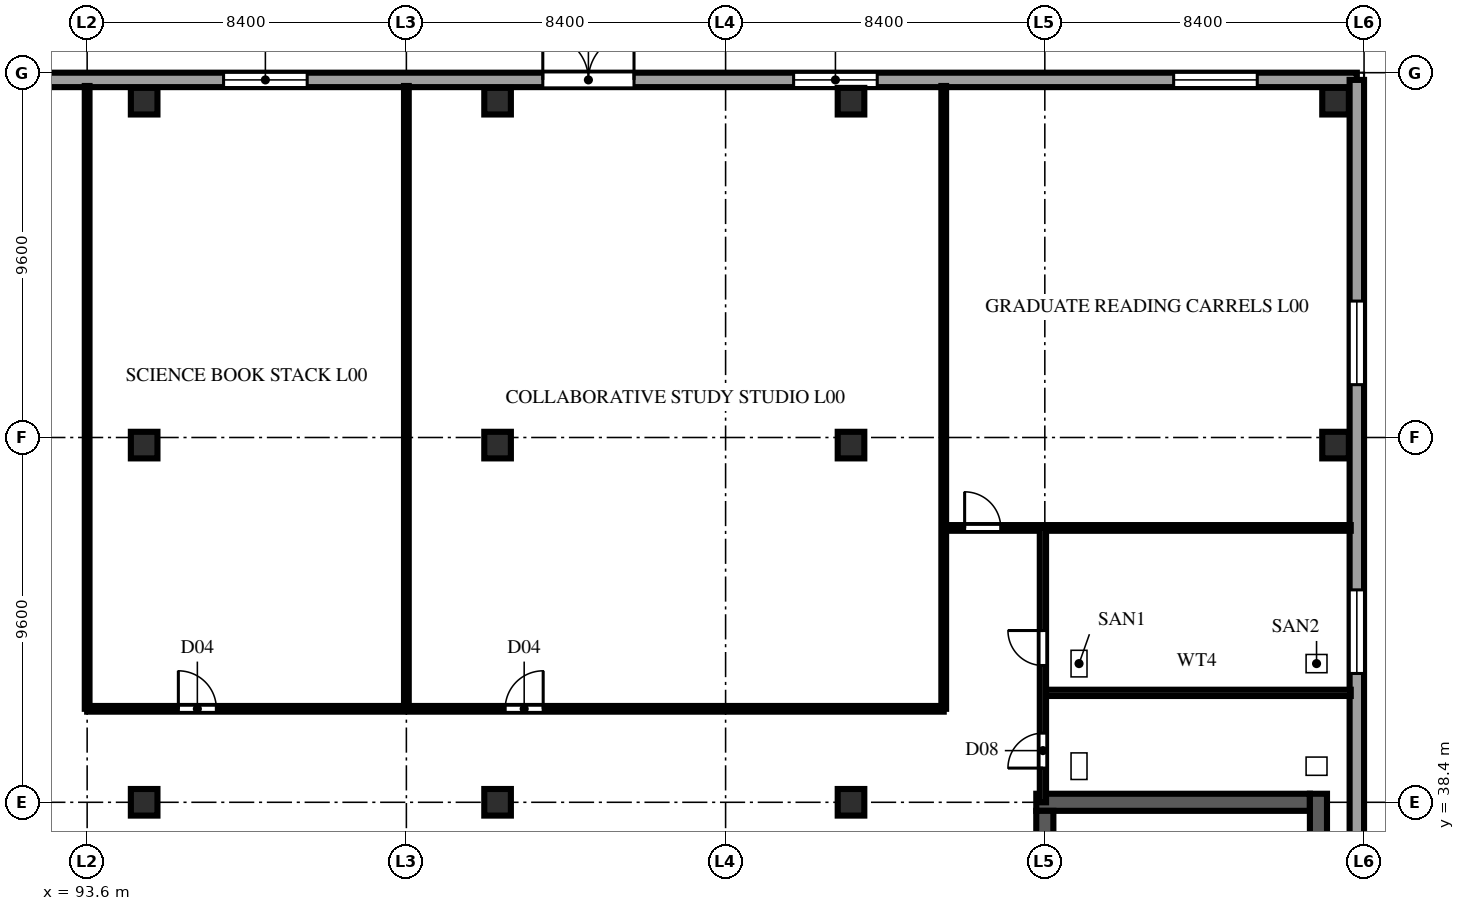
"""IFC4 building model, lengths in metres.
Left out: names, types, materials, properties, quantities, classifications, styles, units other than length and angle.
Written with IfcOpenShell. Run it as: python <this file> out.ifc"""

import sys

from ifc_helpers import new_model, si_unit, direction, frame, frame_2d, origin, origin_2d, place, context, subcontext, project, spatial, rectangle, extrude, element, fill, save


model = new_model("IFC4")
c1 = context("Model", 3, precision=1e-05, world=origin(), true_north=direction((0.0, 1.0)))
c2 = subcontext(c1, "Body", "Model", "MODEL_VIEW")
j1 = project(units=[si_unit("LENGTHUNIT", "METRE"), si_unit("PLANEANGLEUNIT", "RADIAN")], contexts=[c1])
p1 = place(None, origin())
s1 = spatial("IfcSite", under=j1, at=p1, CompositionType="ELEMENT")
p2 = place(p1, origin())
s2 = spatial("IfcBuilding", under=s1, at=p2, CompositionType="ELEMENT")
p3 = place(p2, origin())
s3 = spatial("IfcBuildingStorey", under=s2, at=p3, CompositionType="ELEMENT", Elevation=0.0)
p4 = place(p3, frame((118.575, 38.4, 0.0), z_axis=(0.0, 0.0, 1.0), x_axis=(1.0, 0.0, 0.0)))
e1 = element("IfcWall", 1, at=p4, inside=s3, PredefinedType="SHEAR", context=c2, shape_type="SweptSolid", body=[
    extrude(rectangle(XDim=7.2, YDim=0.45, at=frame_2d((3.6, 0.0))), origin(), (0.0, 0.0, 1.0), 4.85),
])
p5 = place(p3, frame((126.0, 18.975, 0.0), z_axis=(0.0, 0.0, 1.0), x_axis=(0.0, 1.0, 0.0)))
e2 = element("IfcWall", 2, at=p5, inside=s3, PredefinedType="SHEAR", context=c2, shape_type="SweptSolid", body=[
    extrude(rectangle(XDim=19.65, YDim=0.45, at=frame_2d((9.825, 0.0))), origin(), (0.0, 0.0, 1.0), 4.85),
])
p6 = place(p3, frame((118.8, 34.4, 0.0), z_axis=(0.0, 0.0, 1.0), x_axis=(0.0, 1.0, 0.0)))
e3 = element("IfcWall", 3, at=p6, inside=s3, PredefinedType="SHEAR", context=c2, shape_type="SweptSolid", body=[
    extrude(rectangle(XDim=3.775, YDim=0.45, at=frame_2d((1.888, 0.0))), origin(), (0.0, 0.0, 1.0), 4.85),
])
for number, where, z_axis, x_axis in (
    (4, (95.1, 38.4, 0.0), (0.0, 0.0, 1.0), (1.0, 0.0, 0.0)),
    (5, (95.1, 47.8, 0.0), (0.0, 0.0, 1.0), (1.0, 0.0, 0.0)),
    (6, (95.1, 56.85, 0.0), (0.0, 0.0, 1.0), (1.0, 0.0, 0.0)),
    (7, (104.4, 38.4, 0.0), (0.0, 0.0, 1.0), (1.0, 0.0, 0.0)),
    (8, (104.4, 47.8, 0.0), (0.0, 0.0, 1.0), (1.0, 0.0, 0.0)),
    (9, (104.4, 56.85, 0.0), (0.0, 0.0, 1.0), (1.0, 0.0, 0.0)),
    (10, (113.7, 38.4, 0.0), (0.0, 0.0, 1.0), (1.0, 0.0, 0.0)),
    (11, (113.7, 47.8, 0.0), (0.0, 0.0, 1.0), (1.0, 0.0, 0.0)),
    (12, (113.7, 56.85, 0.0), (0.0, 0.0, 1.0), (1.0, 0.0, 0.0)),
    (13, (126.45, 47.8, 0.0), (0.0, 0.0, 1.0), (1.0, 0.0, 0.0)),
    (14, (126.45, 56.85, 0.0), (0.0, 0.0, 1.0), (1.0, 0.0, 0.0)),
):
    element("IfcColumn", number, at=place(p3, frame(where, z_axis=z_axis, x_axis=x_axis)), inside=s3, PredefinedType="COLUMN", context=c2, shape_type="SweptSolid", body=[
        extrude(rectangle(XDim=0.7, YDim=0.7, at=origin_2d()), origin(), (0.0, 0.0, 1.0), 5.2),
    ])
p7 = place(p3, frame((85.39, 57.41, 0.0), z_axis=(0.0, 0.0, 1.0), x_axis=(1.0, 0.0, 0.0)))
e15 = element("IfcWall", 15, at=p7, inside=s3, PredefinedType="SOLIDWALL", context=c2, shape_type="SweptSolid", body=[
    extrude(rectangle(XDim=41.62, YDim=0.38, at=frame_2d((20.81, 0.0))), origin(), (0.0, 0.0, 1.0), 4.85),
])
p8 = place(p7, frame((5.0, 0.0, 0.85)))
e16 = element("IfcOpeningElement", 16, at=p8, cuts=e15, PredefinedType="OPENING", context=c2, shape_type="SweptSolid", body=[
    extrude(rectangle(XDim=2.2, YDim=2.25, at=frame_2d((1.1, 1.125))), frame((0.0, 0.202, 0.0), z_axis=(0.0, -1.0, 0.0), x_axis=(1.0, 0.0, 0.0)), (0.0, 0.0, 1.0), 0.404),
])
p9 = place(p7, frame((11.8, 0.0, 0.85)))
e17 = element("IfcOpeningElement", 17, at=p9, cuts=e15, PredefinedType="OPENING", context=c2, shape_type="SweptSolid", body=[
    extrude(rectangle(XDim=2.2, YDim=2.25, at=frame_2d((1.1, 1.125))), frame((0.0, 0.202, 0.0), z_axis=(0.0, -1.0, 0.0), x_axis=(1.0, 0.0, 0.0)), (0.0, 0.0, 1.0), 0.404),
])
p10 = place(p7, frame((20.2, 0.0, 0.0)))
e18 = element("IfcOpeningElement", 18, at=p10, cuts=e15, PredefinedType="OPENING", context=c2, shape_type="SweptSolid", body=[
    extrude(rectangle(XDim=2.4, YDim=2.6, at=frame_2d((1.2, 1.3))), frame((0.0, 0.202, 0.0), z_axis=(0.0, -1.0, 0.0), x_axis=(1.0, 0.0, 0.0)), (0.0, 0.0, 1.0), 0.404),
])
p11 = place(p7, frame((26.8, 0.0, 0.85)))
e19 = element("IfcOpeningElement", 19, at=p11, cuts=e15, PredefinedType="OPENING", context=c2, shape_type="SweptSolid", body=[
    extrude(rectangle(XDim=2.2, YDim=2.25, at=frame_2d((1.1, 1.125))), frame((0.0, 0.202, 0.0), z_axis=(0.0, -1.0, 0.0), x_axis=(1.0, 0.0, 0.0)), (0.0, 0.0, 1.0), 0.404),
])
p12 = place(p7, frame((36.8, 0.0, 0.85)))
e20 = element("IfcOpeningElement", 20, at=p12, cuts=e15, PredefinedType="OPENING", context=c2, shape_type="SweptSolid", body=[
    extrude(rectangle(XDim=2.2, YDim=2.25, at=frame_2d((1.1, 1.125))), frame((0.0, 0.202, 0.0), z_axis=(0.0, -1.0, 0.0), x_axis=(1.0, 0.0, 0.0)), (0.0, 0.0, 1.0), 0.404),
])
p13 = place(p3, frame((127.01, 0.19, 0.0), z_axis=(0.0, 0.0, 1.0), x_axis=(0.0, 1.0, 0.0)))
e21 = element("IfcWall", 21, at=p13, inside=s3, PredefinedType="SOLIDWALL", context=c2, shape_type="SweptSolid", body=[
    extrude(rectangle(XDim=57.22, YDim=0.38, at=frame_2d((28.61, 0.0))), origin(), (0.0, 0.0, 1.0), 4.85),
])
p14 = place(p13, frame((3.6, 0.0, 0.85)))
e22 = element("IfcOpeningElement", 22, at=p14, cuts=e21, PredefinedType="OPENING", context=c2, shape_type="SweptSolid", body=[
    extrude(rectangle(XDim=2.2, YDim=2.25, at=frame_2d((1.1, 1.125))), frame((0.0, 0.202, 0.0), z_axis=(0.0, -1.0, 0.0), x_axis=(1.0, 0.0, 0.0)), (0.0, 0.0, 1.0), 0.404),
])
p15 = place(p13, frame((11.2, 0.0, 0.85)))
e23 = element("IfcOpeningElement", 23, at=p15, cuts=e21, PredefinedType="OPENING", context=c2, shape_type="SweptSolid", body=[
    extrude(rectangle(XDim=2.2, YDim=2.25, at=frame_2d((1.1, 1.125))), frame((0.0, 0.202, 0.0), z_axis=(0.0, -1.0, 0.0), x_axis=(1.0, 0.0, 0.0)), (0.0, 0.0, 1.0), 0.404),
])
p16 = place(p13, frame((41.6, 0.0, 0.85)))
e24 = element("IfcOpeningElement", 24, at=p16, cuts=e21, PredefinedType="OPENING", context=c2, shape_type="SweptSolid", body=[
    extrude(rectangle(XDim=2.2, YDim=2.25, at=frame_2d((1.1, 1.125))), frame((0.0, 0.202, 0.0), z_axis=(0.0, -1.0, 0.0), x_axis=(1.0, 0.0, 0.0)), (0.0, 0.0, 1.0), 0.404),
])
p17 = place(p13, frame((49.2, 0.0, 0.85)))
e25 = element("IfcOpeningElement", 25, at=p17, cuts=e21, PredefinedType="OPENING", context=c2, shape_type="SweptSolid", body=[
    extrude(rectangle(XDim=2.2, YDim=2.25, at=frame_2d((1.1, 1.125))), frame((0.0, 0.202, 0.0), z_axis=(0.0, -1.0, 0.0), x_axis=(1.0, 0.0, 0.0)), (0.0, 0.0, 1.0), 0.404),
])
for number, where, z_axis, x_axis in (
    (26, (93.6, 40.86, 0.0), (0.0, 0.0, 1.0), (0.0, 1.0, 0.0)),
    (27, (102.0, 40.86, 0.0), (0.0, 0.0, 1.0), (0.0, 1.0, 0.0)),
    (28, (116.14, 40.86, 0.0), (0.0, 0.0, 1.0), (0.0, 1.0, 0.0)),
):
    element("IfcWall", number, at=place(p3, frame(where, z_axis=z_axis, x_axis=x_axis)), inside=s3, PredefinedType="PARTITIONING", context=c2, shape_type="SweptSolid", body=[
        extrude(rectangle(XDim=16.39, YDim=0.125, at=frame_2d((8.195, 0.0))), origin(), (0.0, 0.0, 1.0), 4.85),
    ])
p18 = place(p3, frame((93.6, 40.86, 0.0), z_axis=(0.0, 0.0, 1.0), x_axis=(1.0, 0.0, 0.0)))
e29 = element("IfcWall", 29, at=p18, inside=s3, PredefinedType="PARTITIONING", context=c2, shape_type="SweptSolid", body=[
    extrude(rectangle(XDim=22.54, YDim=0.15, at=frame_2d((11.27, 0.0))), origin(), (0.0, 0.0, 1.0), 4.85),
])
p19 = place(p18, frame((2.4, 0.0, 0.0)))
e30 = element("IfcOpeningElement", 30, at=p19, cuts=e29, PredefinedType="OPENING", context=c2, shape_type="SweptSolid", body=[
    extrude(rectangle(XDim=1.0, YDim=2.2, at=frame_2d((0.5, 1.1))), frame((0.0, 0.087, 0.0), z_axis=(0.0, -1.0, 0.0), x_axis=(1.0, 0.0, 0.0)), (0.0, 0.0, 1.0), 0.174),
])
p20 = place(p18, frame((11.0, 0.0, 0.0)))
e31 = element("IfcOpeningElement", 31, at=p20, cuts=e29, PredefinedType="OPENING", context=c2, shape_type="SweptSolid", body=[
    extrude(rectangle(XDim=1.0, YDim=2.2, at=frame_2d((0.5, 1.1))), frame((0.0, 0.087, 0.0), z_axis=(0.0, -1.0, 0.0), x_axis=(1.0, 0.0, 0.0)), (0.0, 0.0, 1.0), 0.174),
])
p21 = place(p3, frame((118.75, 41.28, 0.0), z_axis=(0.0, 0.0, 1.0), x_axis=(1.0, 0.0, 0.0)))
e32 = element("IfcWall", 32, at=p21, inside=s3, PredefinedType="PLUMBINGWALL", context=c2, shape_type="SweptSolid", body=[
    extrude(rectangle(XDim=8.1, YDim=0.165, at=frame_2d((4.05, 0.0))), origin(), (0.0, 0.0, 1.0), 4.85),
])
p22 = place(p3, frame((116.14, 45.62, 0.0), z_axis=(0.0, 0.0, 1.0), x_axis=(1.0, 0.0, 0.0)))
e33 = element("IfcWall", 33, at=p22, inside=s3, PredefinedType="PARTITIONING", context=c2, shape_type="SweptSolid", body=[
    extrude(rectangle(XDim=10.71, YDim=0.15, at=frame_2d((5.355, 0.0))), origin(), (0.0, 0.0, 1.0), 4.85),
])
p23 = place(p22, frame((0.55, 0.0, 0.0)))
e34 = element("IfcOpeningElement", 34, at=p23, cuts=e33, PredefinedType="OPENING", context=c2, shape_type="SweptSolid", body=[
    extrude(rectangle(XDim=0.95, YDim=2.15, at=frame_2d((0.475, 1.075))), frame((0.0, 0.087, 0.0), z_axis=(0.0, -1.0, 0.0), x_axis=(1.0, 0.0, 0.0)), (0.0, 0.0, 1.0), 0.174),
])
p24 = place(p3, frame((118.75, 38.4, 0.0), z_axis=(0.0, 0.0, 1.0), x_axis=(0.0, 1.0, 0.0)))
e35 = element("IfcWall", 35, at=p24, inside=s3, PredefinedType="PLUMBINGWALL", context=c2, shape_type="SweptSolid", body=[
    extrude(rectangle(XDim=7.22, YDim=0.165, at=frame_2d((3.61, 0.0))), origin(), (0.0, 0.0, 1.0), 4.85),
])
p25 = place(p24, frame((0.9, 0.0, 0.0)))
e36 = element("IfcOpeningElement", 36, at=p25, cuts=e35, PredefinedType="OPENING", context=c2, shape_type="SweptSolid", body=[
    extrude(rectangle(XDim=0.92, YDim=2.15, at=frame_2d((0.46, 1.075))), frame((0.0, 0.094, 0.0), z_axis=(0.0, -1.0, 0.0), x_axis=(1.0, 0.0, 0.0)), (0.0, 0.0, 1.0), 0.189),
])
p26 = place(p24, frame((3.6, 0.0, 0.0)))
e37 = element("IfcOpeningElement", 37, at=p26, cuts=e35, PredefinedType="OPENING", context=c2, shape_type="SweptSolid", body=[
    extrude(rectangle(XDim=0.92, YDim=2.15, at=frame_2d((0.46, 1.075))), frame((0.0, 0.094, 0.0), z_axis=(0.0, -1.0, 0.0), x_axis=(1.0, 0.0, 0.0)), (0.0, 0.0, 1.0), 0.189),
])
p27 = place(p9, origin())
e38 = element("IfcWindow", 38, at=p27, inside=s3, PartitioningType="DOUBLE_PANEL_VERTICAL", PredefinedType="WINDOW", context=c2, shape_type="SweptSolid", body=[
    extrude(rectangle(XDim=2.2, YDim=2.25, at=frame_2d((1.1, 1.125))), frame((0.0, 0.11, 0.0), z_axis=(0.0, -1.0, 0.0), x_axis=(1.0, 0.0, 0.0)), (0.0, 0.0, 1.0), 0.06),
])
fill(e17, e38)
p28 = place(p10, origin())
e39 = element("IfcDoor", 39, at=p28, inside=s3, OperationType="DOUBLE_SWING_LEFT", PredefinedType="DOOR", context=c2, shape_type="SweptSolid", body=[
    extrude(rectangle(XDim=2.4, YDim=2.6, at=frame_2d((1.2, 1.3))), frame((0.0, 0.025, 0.0), z_axis=(0.0, -1.0, 0.0), x_axis=(1.0, 0.0, 0.0)), (0.0, 0.0, 1.0), 0.05),
])
fill(e18, e39)
p29 = place(p11, origin())
e40 = element("IfcWindow", 40, at=p29, inside=s3, PartitioningType="DOUBLE_PANEL_VERTICAL", PredefinedType="WINDOW", context=c2, shape_type="SweptSolid", body=[
    extrude(rectangle(XDim=2.2, YDim=2.25, at=frame_2d((1.1, 1.125))), frame((0.0, 0.11, 0.0), z_axis=(0.0, -1.0, 0.0), x_axis=(1.0, 0.0, 0.0)), (0.0, 0.0, 1.0), 0.06),
])
fill(e19, e40)
p30 = place(p12, origin())
e41 = element("IfcWindow", 41, at=p30, inside=s3, PartitioningType="DOUBLE_PANEL_VERTICAL", PredefinedType="WINDOW", context=c2, shape_type="SweptSolid", body=[
    extrude(rectangle(XDim=2.2, YDim=2.25, at=frame_2d((1.1, 1.125))), frame((0.0, 0.11, 0.0), z_axis=(0.0, -1.0, 0.0), x_axis=(1.0, 0.0, 0.0)), (0.0, 0.0, 1.0), 0.06),
])
fill(e20, e41)
p31 = place(p16, origin())
e42 = element("IfcWindow", 42, at=p31, inside=s3, PartitioningType="DOUBLE_PANEL_VERTICAL", PredefinedType="WINDOW", context=c2, shape_type="SweptSolid", body=[
    extrude(rectangle(XDim=2.2, YDim=2.25, at=frame_2d((1.1, 1.125))), frame((0.0, 0.11, 0.0), z_axis=(0.0, -1.0, 0.0), x_axis=(1.0, 0.0, 0.0)), (0.0, 0.0, 1.0), 0.06),
])
fill(e24, e42)
p32 = place(p17, origin())
e43 = element("IfcWindow", 43, at=p32, inside=s3, PartitioningType="DOUBLE_PANEL_VERTICAL", PredefinedType="WINDOW", context=c2, shape_type="SweptSolid", body=[
    extrude(rectangle(XDim=2.2, YDim=2.25, at=frame_2d((1.1, 1.125))), frame((0.0, 0.11, 0.0), z_axis=(0.0, -1.0, 0.0), x_axis=(1.0, 0.0, 0.0)), (0.0, 0.0, 1.0), 0.06),
])
fill(e25, e43)
p33 = place(p19, origin())
e44 = element("IfcDoor", 44, at=p33, inside=s3, OperationType="SINGLE_SWING_LEFT", PredefinedType="DOOR", context=c2, shape_type="SweptSolid", body=[
    extrude(rectangle(XDim=1.0, YDim=2.2, at=frame_2d((0.5, 1.1))), frame((0.0, 0.025, 0.0), z_axis=(0.0, -1.0, 0.0), x_axis=(1.0, 0.0, 0.0)), (0.0, 0.0, 1.0), 0.05),
])
fill(e30, e44)
p34 = place(p20, origin())
e45 = element("IfcDoor", 45, at=p34, inside=s3, OperationType="SINGLE_SWING_RIGHT", PredefinedType="DOOR", context=c2, shape_type="SweptSolid", body=[
    extrude(rectangle(XDim=1.0, YDim=2.2, at=frame_2d((0.5, 1.1))), frame((0.0, 0.025, 0.0), z_axis=(0.0, -1.0, 0.0), x_axis=(1.0, 0.0, 0.0)), (0.0, 0.0, 1.0), 0.05),
])
fill(e31, e45)
p35 = place(p23, origin())
e46 = element("IfcDoor", 46, at=p35, inside=s3, OperationType="SINGLE_SWING_LEFT", PredefinedType="DOOR", context=c2, shape_type="SweptSolid", body=[
    extrude(rectangle(XDim=0.95, YDim=2.15, at=frame_2d((0.475, 1.075))), frame((0.0, 0.025, 0.0), z_axis=(0.0, -1.0, 0.0), x_axis=(1.0, 0.0, 0.0)), (0.0, 0.0, 1.0), 0.05),
])
fill(e34, e46)
p36 = place(p25, origin())
e47 = element("IfcDoor", 47, at=p36, inside=s3, OperationType="SINGLE_SWING_LEFT", PredefinedType="DOOR", context=c2, shape_type="SweptSolid", body=[
    extrude(rectangle(XDim=0.92, YDim=2.15, at=frame_2d((0.46, 1.075))), frame((0.0, 0.025, 0.0), z_axis=(0.0, -1.0, 0.0), x_axis=(1.0, 0.0, 0.0)), (0.0, 0.0, 1.0), 0.05),
])
fill(e36, e47)
p37 = place(p26, origin())
e48 = element("IfcDoor", 48, at=p37, inside=s3, OperationType="SINGLE_SWING_RIGHT", PredefinedType="DOOR", context=c2, shape_type="SweptSolid", body=[
    extrude(rectangle(XDim=0.92, YDim=2.15, at=frame_2d((0.46, 1.075))), frame((0.0, 0.025, 0.0), z_axis=(0.0, -1.0, 0.0), x_axis=(1.0, 0.0, 0.0)), (0.0, 0.0, 1.0), 0.05),
])
fill(e37, e48)
save(model, sys.argv[1])
